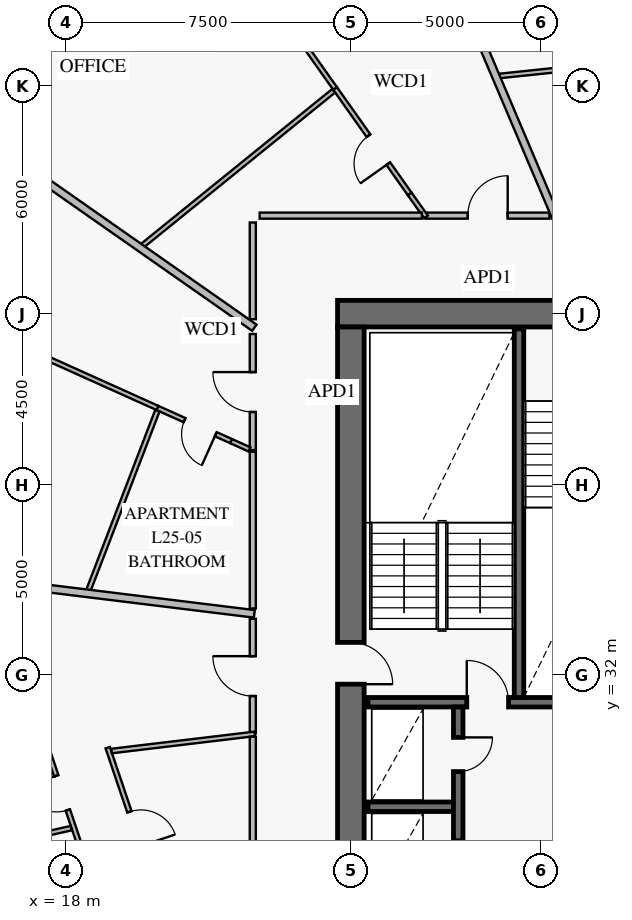
"""IFC4 building model, lengths in metres.
Left out: names, types, materials, properties, quantities, classifications, styles, units other than length and angle.
Written with IfcOpenShell. Run it as: python <this file> out.ifc"""

import sys

from ifc_helpers import new_model, si_unit, direction, frame, frame_2d, origin, place, context, subcontext, project, spatial, rectangle, extrude, element, fill, save


model = new_model("IFC4")
c1 = context("Model", 3, precision=1e-05, world=origin(), true_north=direction((0.0, 1.0)))
c2 = subcontext(c1, "Body", "Model", "MODEL_VIEW")
j1 = project(units=[si_unit("LENGTHUNIT", "METRE"), si_unit("PLANEANGLEUNIT", "RADIAN")], contexts=[c1])
p1 = place(None, origin())
s1 = spatial("IfcSite", under=j1, at=p1, CompositionType="ELEMENT")
p2 = place(p1, origin())
s2 = spatial("IfcBuilding", under=s1, at=p2, CompositionType="ELEMENT")
p3 = place(p2, frame((0.0, 0.0, 103.8)))
s3 = spatial("IfcBuildingStorey", under=s2, at=p3, CompositionType="ELEMENT", Elevation=103.8)
p4 = place(p3, frame((36.75, 41.5, 0.0), z_axis=(0.0, 0.0, 1.0), x_axis=(-1.0, 0.0, 0.0)))
e1 = element("IfcWall", 1, at=p4, inside=s3, PredefinedType="SHEAR", context=c2, shape_type="SweptSolid", body=[
    extrude(rectangle(XDim=11.6, YDim=0.7, at=frame_2d((5.8, 0.0))), origin(), (0.0, 0.0, 1.0), 3.8),
])
p5 = place(p4, frame((4.25, 0.0, 0.0)))
e2 = element("IfcOpeningElement", 2, at=p5, cuts=e1, PredefinedType="OPENING", context=c2, shape_type="SweptSolid", body=[
    extrude(rectangle(XDim=1.1, YDim=2.15, at=frame_2d((0.55, 1.075))), frame((0.0, 0.362, 0.0), z_axis=(0.0, -1.0, 0.0), x_axis=(1.0, 0.0, 0.0)), (0.0, 0.0, 1.0), 0.724),
])
p6 = place(p3, frame((25.5, 22.85, 0.0), z_axis=(0.0, 0.0, 1.0), x_axis=(0.0, 1.0, 0.0)))
e3 = element("IfcWall", 3, at=p6, inside=s3, PredefinedType="SHEAR", context=c2, shape_type="SweptSolid", body=[
    extrude(rectangle(XDim=18.3, YDim=0.7, at=frame_2d((9.15, 0.0))), origin(), (0.0, 0.0, 1.0), 3.8),
])
p7 = place(p6, frame((8.9, 0.0, 0.0)))
e4 = element("IfcOpeningElement", 4, at=p7, cuts=e3, PredefinedType="OPENING", context=c2, shape_type="SweptSolid", body=[
    extrude(rectangle(XDim=1.1, YDim=2.15, at=frame_2d((0.55, 1.075))), frame((0.0, 0.362, 0.0), z_axis=(0.0, -1.0, 0.0), x_axis=(1.0, 0.0, 0.0)), (0.0, 0.0, 1.0), 0.724),
])
p8 = place(p3, frame((25.95, 31.275, 0.0), z_axis=(0.0, 0.0, 1.0), x_axis=(1.0, 0.0, 0.0)))
e5 = element("IfcWall", 5, at=p8, inside=s3, PredefinedType="SOLIDWALL", context=c2, shape_type="SweptSolid", body=[
    extrude(rectangle(XDim=20.1, YDim=0.25, at=frame_2d((10.05, 0.0))), origin(), (0.0, 0.0, 1.0), 3.8),
])
p9 = place(p8, frame((2.6, 0.0, 0.0)))
e6 = element("IfcOpeningElement", 6, at=p9, cuts=e5, PredefinedType="OPENING", context=c2, shape_type="SweptSolid", body=[
    extrude(rectangle(XDim=1.1, YDim=2.15, at=frame_2d((0.55, 1.075))), frame((0.0, 0.137, 0.0), z_axis=(0.0, -1.0, 0.0), x_axis=(1.0, 0.0, 0.0)), (0.0, 0.0, 1.0), 0.274),
])
p10 = place(p8, frame((10.6, 0.0, 0.0)))
e7 = element("IfcOpeningElement", 7, at=p10, cuts=e5, PredefinedType="OPENING", context=c2, shape_type="SweptSolid", body=[
    extrude(rectangle(XDim=1.1, YDim=2.15, at=frame_2d((0.55, 1.075))), frame((0.0, 0.137, 0.0), z_axis=(0.0, -1.0, 0.0), x_axis=(1.0, 0.0, 0.0)), (0.0, 0.0, 1.0), 0.274),
])
p11 = place(p8, frame((16.35, 0.0, 0.0)))
e8 = element("IfcOpeningElement", 8, at=p11, cuts=e5, PredefinedType="OPENING", context=c2, shape_type="SweptSolid", body=[
    extrude(rectangle(XDim=1.1, YDim=2.15, at=frame_2d((0.55, 1.075))), frame((0.0, 0.137, 0.0), z_axis=(0.0, -1.0, 0.0), x_axis=(1.0, 0.0, 0.0)), (0.0, 0.0, 1.0), 0.274),
])
p12 = place(p3, frame((29.925, 31.4, 0.0), z_axis=(0.0, 0.0, 1.0), x_axis=(0.0, 1.0, 0.0)))
e9 = element("IfcWall", 9, at=p12, inside=s3, PredefinedType="SOLIDWALL", context=c2, shape_type="SweptSolid", body=[
    extrude(rectangle(XDim=9.7, YDim=0.25, at=frame_2d((4.85, 0.0))), origin(), (0.0, 0.0, 1.0), 3.8),
])
p13 = place(p3, frame((25.95, 28.525, 0.0), z_axis=(0.0, 0.0, 1.0), x_axis=(1.0, 0.0, 0.0)))
e10 = element("IfcWall", 10, at=p13, inside=s3, PredefinedType="SOLIDWALL", context=c2, shape_type="SweptSolid", body=[
    extrude(rectangle(XDim=2.25, YDim=0.25, at=frame_2d((1.125, 0.0))), origin(), (0.0, 0.0, 1.0), 3.8),
])
p14 = place(p3, frame((28.325, 22.95, 0.0), z_axis=(0.0, 0.0, 1.0), x_axis=(0.0, 1.0, 0.0)))
e11 = element("IfcWall", 11, at=p14, inside=s3, PredefinedType="SOLIDWALL", context=c2, shape_type="SweptSolid", body=[
    extrude(rectangle(XDim=8.2, YDim=0.25, at=frame_2d((4.1, 0.0))), origin(), (0.0, 0.0, 1.0), 3.8),
])
p15 = place(p14, frame((0.75, 0.0, 0.0)))
e12 = element("IfcOpeningElement", 12, at=p15, cuts=e11, PredefinedType="OPENING", context=c2, shape_type="SweptSolid", body=[
    extrude(rectangle(XDim=1.3, YDim=2.3, at=frame_2d((0.65, 1.15))), frame((0.0, 0.137, 0.0), z_axis=(0.0, -1.0, 0.0), x_axis=(1.0, 0.0, 0.0)), (0.0, 0.0, 1.0), 0.274),
])
p16 = place(p14, frame((3.78, 0.0, 0.0)))
e13 = element("IfcOpeningElement", 13, at=p16, cuts=e11, PredefinedType="OPENING", context=c2, shape_type="SweptSolid", body=[
    extrude(rectangle(XDim=0.9, YDim=2.1, at=frame_2d((0.45, 1.05))), frame((0.0, 0.137, 0.0), z_axis=(0.0, -1.0, 0.0), x_axis=(1.0, 0.0, 0.0)), (0.0, 0.0, 1.0), 0.274),
])
p17 = place(p14, frame((6.5, 0.0, 0.0)))
e14 = element("IfcOpeningElement", 14, at=p17, cuts=e11, PredefinedType="OPENING", context=c2, shape_type="SweptSolid", body=[
    extrude(rectangle(XDim=0.9, YDim=2.1, at=frame_2d((0.45, 1.05))), frame((0.0, 0.137, 0.0), z_axis=(0.0, -1.0, 0.0), x_axis=(1.0, 0.0, 0.0)), (0.0, 0.0, 1.0), 0.274),
])
p18 = place(p3, frame((27.05, 44.65, 0.0), z_axis=(0.0, 0.0, 1.0), x_axis=(-0.577553372085, 0.816352927595, 0.0)))
e15 = element("IfcWall", 15, at=p18, inside=s3, PredefinedType="PARTITIONING", context=c2, shape_type="SweptSolid", body=[
    extrude(rectangle(XDim=3.402, YDim=0.12, at=frame_2d((1.701, 0.0))), origin(), (0.0, 0.0, 1.0), 3.55),
])
p19 = place(p18, frame((0.979, 0.0, 0.0)))
e16 = element("IfcOpeningElement", 16, at=p19, cuts=e15, PredefinedType="OPENING", context=c2, shape_type="SweptSolid", body=[
    extrude(rectangle(XDim=0.9, YDim=2.1, at=frame_2d((0.45, 1.05))), frame((0.0, 0.072, 0.0), z_axis=(0.0, -1.0, 0.0), x_axis=(1.0, 0.0, 0.0)), (0.0, 0.0, 1.0), 0.144),
])
p20 = place(p3, frame((25.085, 47.427, 0.0), z_axis=(0.0, 0.0, 1.0), x_axis=(-0.577572190058, 0.81633961393, 0.0)))
e17 = element("IfcWall", 17, at=p20, inside=s3, PredefinedType="PARTITIONING", context=c2, shape_type="SweptSolid", body=[
    extrude(rectangle(XDim=7.275, YDim=0.12, at=frame_2d((3.638, 0.0))), origin(), (0.0, 0.0, 1.0), 3.1),
])
p21 = place(p20, frame((4.044, 0.0, 0.0)))
e18 = element("IfcOpeningElement", 18, at=p21, cuts=e17, PredefinedType="OPENING", context=c2, shape_type="SweptSolid", body=[
    extrude(rectangle(XDim=0.95, YDim=2.1, at=frame_2d((0.475, 1.05))), frame((0.0, 0.072, 0.0), z_axis=(0.0, -1.0, 0.0), x_axis=(1.0, 0.0, 0.0)), (0.0, 0.0, 1.0), 0.144),
])
p22 = place(p3, frame((30.726, 44.08, 0.0), z_axis=(0.0, 0.0, 1.0), x_axis=(-1.0, 0.0, 0.0)))
e19 = element("IfcWall", 19, at=p22, inside=s3, PredefinedType="PARTITIONING", context=c2, shape_type="SweptSolid", body=[
    extrude(rectangle(XDim=3.248, YDim=0.16, at=frame_2d((1.624, 0.0))), origin(), (0.0, 0.0, 1.0), 3.55),
])
p23 = place(p22, frame((1.099, 0.0, 0.0)))
e20 = element("IfcOpeningElement", 20, at=p23, cuts=e19, PredefinedType="OPENING", context=c2, shape_type="SweptSolid", body=[
    extrude(rectangle(XDim=1.05, YDim=2.15, at=frame_2d((0.525, 1.075))), frame((0.0, 0.092, 0.0), z_axis=(0.0, -1.0, 0.0), x_axis=(1.0, 0.0, 0.0)), (0.0, 0.0, 1.0), 0.184),
])
p24 = place(p3, frame((22.35, 38.146, 0.0), z_axis=(0.0, 0.0, 1.0), x_axis=(-0.911826982845, 0.410574662341, 0.0)))
e21 = element("IfcWall", 21, at=p24, inside=s3, PredefinedType="PARTITIONING", context=c2, shape_type="SweptSolid", body=[
    extrude(rectangle(XDim=2.127, YDim=0.12, at=frame_2d((1.063, 0.0))), origin(), (0.0, 0.0, 1.0), 3.55),
])
p25 = place(p24, frame((0.443, 0.0, 0.0)))
e22 = element("IfcOpeningElement", 22, at=p25, cuts=e21, PredefinedType="OPENING", context=c2, shape_type="SweptSolid", body=[
    extrude(rectangle(XDim=0.9, YDim=2.1, at=frame_2d((0.45, 1.05))), frame((0.0, 0.072, 0.0), z_axis=(0.0, -1.0, 0.0), x_axis=(1.0, 0.0, 0.0)), (0.0, 0.0, 1.0), 0.144),
])
p26 = place(p3, frame((20.411, 39.019, 0.0), z_axis=(0.0, 0.0, 1.0), x_axis=(-0.911837449282, 0.410551417104, 0.0)))
e23 = element("IfcWall", 23, at=p26, inside=s3, PredefinedType="PARTITIONING", context=c2, shape_type="SweptSolid", body=[
    extrude(rectangle(XDim=9.404, YDim=0.12, at=frame_2d((4.702, 0.0))), origin(), (0.0, 0.0, 1.0), 3.1),
])
p27 = place(p26, frame((4.202, 0.0, 0.0)))
e24 = element("IfcOpeningElement", 24, at=p27, cuts=e23, PredefinedType="OPENING", context=c2, shape_type="SweptSolid", body=[
    extrude(rectangle(XDim=0.95, YDim=2.1, at=frame_2d((0.475, 1.05))), frame((0.0, 0.072, 0.0), z_axis=(0.0, -1.0, 0.0), x_axis=(1.0, 0.0, 0.0)), (0.0, 0.0, 1.0), 0.144),
])
p28 = place(p3, frame((22.92, 40.965, 0.0), z_axis=(0.0, 0.0, 1.0), x_axis=(0.0, -1.0, 0.0)))
e25 = element("IfcWall", 25, at=p28, inside=s3, PredefinedType="PARTITIONING", context=c2, shape_type="SweptSolid", body=[
    extrude(rectangle(XDim=3.054, YDim=0.16, at=frame_2d((1.527, 0.0))), origin(), (0.0, 0.0, 1.0), 3.55),
])
p29 = place(p28, frame((1.002, 0.0, 0.0)))
e26 = element("IfcOpeningElement", 26, at=p29, cuts=e25, PredefinedType="OPENING", context=c2, shape_type="SweptSolid", body=[
    extrude(rectangle(XDim=1.05, YDim=2.15, at=frame_2d((0.525, 1.075))), frame((0.0, 0.092, 0.0), z_axis=(0.0, -1.0, 0.0), x_axis=(1.0, 0.0, 0.0)), (0.0, 0.0, 1.0), 0.184),
])
p30 = place(p3, frame((19.103, 30.08, 0.0), z_axis=(0.0, 0.0, 1.0), x_axis=(0.319961945867, -0.947430394909, 0.0)))
e27 = element("IfcWall", 27, at=p30, inside=s3, PredefinedType="PARTITIONING", context=c2, shape_type="SweptSolid", body=[
    extrude(rectangle(XDim=7.174, YDim=0.12, at=frame_2d((3.587, 0.0))), origin(), (0.0, 0.0, 1.0), 2.85),
])
p31 = place(p30, frame((1.782, 0.0, 0.0)))
e28 = element("IfcOpeningElement", 28, at=p31, cuts=e27, PredefinedType="OPENING", context=c2, shape_type="SweptSolid", body=[
    extrude(rectangle(XDim=0.95, YDim=2.1, at=frame_2d((0.475, 1.05))), frame((0.0, 0.072, 0.0), z_axis=(0.0, -1.0, 0.0), x_axis=(1.0, 0.0, 0.0)), (0.0, 0.0, 1.0), 0.144),
])
p32 = place(p30, frame((5.292, 0.0, 0.0)))
e29 = element("IfcOpeningElement", 29, at=p32, cuts=e27, PredefinedType="OPENING", context=c2, shape_type="SweptSolid", body=[
    extrude(rectangle(XDim=0.9, YDim=2.1, at=frame_2d((0.45, 1.05))), frame((0.0, 0.072, 0.0), z_axis=(0.0, -1.0, 0.0), x_axis=(1.0, 0.0, 0.0)), (0.0, 0.0, 1.0), 0.144),
])
p33 = place(p3, frame((17.561, 29.896, 0.0), z_axis=(0.0, 0.0, 1.0), x_axis=(0.319947688878, -0.947435209596, 0.0)))
e30 = element("IfcWall", 30, at=p33, inside=s3, PredefinedType="PARTITIONING", context=c2, shape_type="SweptSolid", body=[
    extrude(rectangle(XDim=7.812, YDim=0.12, at=frame_2d((3.906, 0.0))), origin(), (0.0, 0.0, 1.0), 2.85),
])
p34 = place(p33, frame((0.587, 0.0, 0.0)))
e31 = element("IfcOpeningElement", 31, at=p34, cuts=e30, PredefinedType="OPENING", context=c2, shape_type="SweptSolid", body=[
    extrude(rectangle(XDim=0.95, YDim=2.1, at=frame_2d((0.475, 1.05))), frame((0.0, 0.072, 0.0), z_axis=(0.0, -1.0, 0.0), x_axis=(1.0, 0.0, 0.0)), (0.0, 0.0, 1.0), 0.144),
])
p35 = place(p33, frame((2.49, 0.0, 0.0)))
e32 = element("IfcOpeningElement", 32, at=p35, cuts=e30, PredefinedType="OPENING", context=c2, shape_type="SweptSolid", body=[
    extrude(rectangle(XDim=0.95, YDim=2.1, at=frame_2d((0.475, 1.05))), frame((0.0, 0.072, 0.0), z_axis=(0.0, -1.0, 0.0), x_axis=(1.0, 0.0, 0.0)), (0.0, 0.0, 1.0), 0.144),
])
p36 = place(p33, frame((4.372, 0.0, 0.0)))
e33 = element("IfcOpeningElement", 33, at=p36, cuts=e30, PredefinedType="OPENING", context=c2, shape_type="SweptSolid", body=[
    extrude(rectangle(XDim=0.95, YDim=2.1, at=frame_2d((0.475, 1.05))), frame((0.0, 0.072, 0.0), z_axis=(0.0, -1.0, 0.0), x_axis=(1.0, 0.0, 0.0)), (0.0, 0.0, 1.0), 0.144),
])
p37 = place(p33, frame((6.274, 0.0, 0.0)))
e34 = element("IfcOpeningElement", 34, at=p37, cuts=e30, PredefinedType="OPENING", context=c2, shape_type="SweptSolid", body=[
    extrude(rectangle(XDim=0.95, YDim=2.1, at=frame_2d((0.475, 1.05))), frame((0.0, 0.072, 0.0), z_axis=(0.0, -1.0, 0.0), x_axis=(1.0, 0.0, 0.0)), (0.0, 0.0, 1.0), 0.144),
])
p38 = place(p3, frame((22.92, 33.47, 0.0), z_axis=(0.0, 0.0, 1.0), x_axis=(0.0, -1.0, 0.0)))
e35 = element("IfcWall", 35, at=p38, inside=s3, PredefinedType="PARTITIONING", context=c2, shape_type="SweptSolid", body=[
    extrude(rectangle(XDim=3.014, YDim=0.16, at=frame_2d((1.507, 0.0))), origin(), (0.0, 0.0, 1.0), 3.55),
])
p39 = place(p38, frame((0.982, 0.0, 0.0)))
e36 = element("IfcOpeningElement", 36, at=p39, cuts=e35, PredefinedType="OPENING", context=c2, shape_type="SweptSolid", body=[
    extrude(rectangle(XDim=1.05, YDim=2.15, at=frame_2d((0.525, 1.075))), frame((0.0, 0.092, 0.0), z_axis=(0.0, -1.0, 0.0), x_axis=(1.0, 0.0, 0.0)), (0.0, 0.0, 1.0), 0.184),
])
p40 = place(p3, frame((35.348, 48.379, 0.0), z_axis=(0.0, 0.0, 1.0), x_axis=(-0.994520791482, -0.104538965509, 0.0)))
e37 = element("IfcWall", 37, at=p40, inside=s3, PredefinedType="PARTITIONING", context=c2, shape_type="SweptSolid", body=[
    extrude(rectangle(XDim=6.014, YDim=0.12, at=frame_2d((3.007, 0.0))), origin(), (0.0, 0.0, 1.0), 2.85),
])
p41 = place(p3, frame((30.889, 44.04, 0.0), z_axis=(0.0, 0.0, 1.0), x_axis=(-0.39073950449, 0.920501298006, 0.0)))
e38 = element("IfcWall", 38, at=p41, inside=s3, PredefinedType="PARTITIONING", context=c2, shape_type="SweptSolid", body=[
    extrude(rectangle(XDim=18.38, YDim=0.2, at=frame_2d((9.19, 0.0))), origin(), (0.0, 0.0, 1.0), 2.8),
])
p42 = place(p3, frame((27.478, 44.045, 0.0), z_axis=(0.0, 0.0, 1.0), x_axis=(-0.577834412399, 0.816154024586, 0.0)))
e39 = element("IfcWall", 39, at=p42, inside=s3, PredefinedType="PARTITIONING", context=c2, shape_type="SweptSolid", body=[
    extrude(rectangle(XDim=0.741, YDim=0.12, at=frame_2d((0.37, 0.0))), origin(), (0.0, 0.0, 1.0), 3.55),
])
p43 = place(p3, frame((25.046, 47.364, 0.0), z_axis=(0.0, 0.0, 1.0), x_axis=(-0.777136993878, -0.629331464926, 0.0)))
e40 = element("IfcWall", 40, at=p43, inside=s3, PredefinedType="PARTITIONING", context=c2, shape_type="SweptSolid", body=[
    extrude(rectangle(XDim=6.483, YDim=0.12, at=frame_2d((3.242, 0.0))), origin(), (0.0, 0.0, 1.0), 2.85),
])
p44 = place(p3, frame((22.96, 41.131, 0.0), z_axis=(0.0, 0.0, 1.0), x_axis=(-0.819148180014, 0.573581955068, 0.0)))
e41 = element("IfcWall", 41, at=p44, inside=s3, PredefinedType="PARTITIONING", context=c2, shape_type="SweptSolid", body=[
    extrude(rectangle(XDim=13.15, YDim=0.2, at=frame_2d((6.575, 0.0))), origin(), (0.0, 0.0, 1.0), 2.8),
])
p45 = place(p3, frame((22.832, 37.929, 0.0), z_axis=(0.0, 0.0, 1.0), x_axis=(-0.911800467551, 0.410633543897, 0.0)))
e42 = element("IfcWall", 42, at=p45, inside=s3, PredefinedType="PARTITIONING", context=c2, shape_type="SweptSolid", body=[
    extrude(rectangle(XDim=0.529, YDim=0.12, at=frame_2d((0.264, 0.0))), origin(), (0.0, 0.0, 1.0), 3.55),
])
p46 = place(p3, frame((20.409, 38.945, 0.0), z_axis=(0.0, 0.0, 1.0), x_axis=(-0.358374938657, -0.933577743598, 0.0)))
e43 = element("IfcWall", 43, at=p46, inside=s3, PredefinedType="PARTITIONING", context=c2, shape_type="SweptSolid", body=[
    extrude(rectangle(XDim=5.092, YDim=0.12, at=frame_2d((2.546, 0.0))), origin(), (0.0, 0.0, 1.0), 2.85),
])
p47 = place(p3, frame((22.96, 33.601, 0.0), z_axis=(0.0, 0.0, 1.0), x_axis=(-0.99254551981, 0.121874489148, 0.0)))
e44 = element("IfcWall", 44, at=p47, inside=s3, PredefinedType="PARTITIONING", context=c2, shape_type="SweptSolid", body=[
    extrude(rectangle(XDim=18.321, YDim=0.2, at=frame_2d((9.161, 0.0))), origin(), (0.0, 0.0, 1.0), 2.8),
])
p48 = place(p3, frame((18.142, 27.962, 0.0), z_axis=(0.0, 0.0, 1.0), x_axis=(-0.975378348773, -0.220538152583, 0.0)))
e45 = element("IfcWall", 45, at=p48, inside=s3, PredefinedType="PARTITIONING", context=c2, shape_type="SweptSolid", body=[
    extrude(rectangle(XDim=12.026, YDim=0.12, at=frame_2d((6.013, 0.0))), origin(), (0.0, 0.0, 1.0), 2.8),
])
p49 = place(p3, frame((22.97, 30.442, 0.0), z_axis=(0.0, 0.0, 1.0), x_axis=(-0.992919730028, -0.118787245617, 0.0)))
e46 = element("IfcWall", 46, at=p49, inside=s3, PredefinedType="PARTITIONING", context=c2, shape_type="SweptSolid", body=[
    extrude(rectangle(XDim=3.792, YDim=0.12, at=frame_2d((1.896, 0.0))), origin(), (0.0, 0.0, 1.0), 3.55),
])
p50 = place(p3, frame((27.37, 44.08, 0.0), z_axis=(0.0, 0.0, 1.0), x_axis=(-1.0, 0.0, 0.0)))
e47 = element("IfcWall", 47, at=p50, inside=s3, PredefinedType="PARTITIONING", context=c2, shape_type="SweptSolid", body=[
    extrude(rectangle(XDim=4.27, YDim=0.16, at=frame_2d((2.135, 0.0))), origin(), (0.0, 0.0, 1.0), 2.85),
])
p51 = place(p3, frame((22.92, 43.9, 0.0), z_axis=(0.0, 0.0, 1.0), x_axis=(0.0, -1.0, 0.0)))
e48 = element("IfcWall", 48, at=p51, inside=s3, PredefinedType="PARTITIONING", context=c2, shape_type="SweptSolid", body=[
    extrude(rectangle(XDim=2.545, YDim=0.16, at=frame_2d((1.273, 0.0))), origin(), (0.0, 0.0, 1.0), 3.55),
])
p52 = place(p3, frame((22.92, 37.867, 0.0), z_axis=(0.0, 0.0, 1.0), x_axis=(0.0, -1.0, 0.0)))
e49 = element("IfcWall", 49, at=p52, inside=s3, PredefinedType="PARTITIONING", context=c2, shape_type="SweptSolid", body=[
    extrude(rectangle(XDim=4.125, YDim=0.16, at=frame_2d((2.062, 0.0))), origin(), (0.0, 0.0, 1.0), 2.85),
])
p53 = place(p3, frame((22.92, 30.367, 0.0), z_axis=(0.0, 0.0, 1.0), x_axis=(0.0, -1.0, 0.0)))
e50 = element("IfcWall", 50, at=p53, inside=s3, PredefinedType="PARTITIONING", context=c2, shape_type="SweptSolid", body=[
    extrude(rectangle(XDim=3.447, YDim=0.16, at=frame_2d((1.723, 0.0))), origin(), (0.0, 0.0, 1.0), 2.85),
])
p54 = place(p7, frame((1.1, 0.0, 0.0), z_axis=(0.0, 0.0, 1.0), x_axis=(-1.0, 0.0, 0.0)))
e51 = element("IfcDoor", 51, at=p54, inside=s3, OperationType="SINGLE_SWING_RIGHT", PredefinedType="USERDEFINED", context=c2, shape_type="SweptSolid", body=[
    extrude(rectangle(XDim=1.1, YDim=2.15, at=frame_2d((0.55, 1.075))), frame((0.0, 0.025, 0.0), z_axis=(0.0, -1.0, 0.0), x_axis=(1.0, 0.0, 0.0)), (0.0, 0.0, 1.0), 0.05),
])
fill(e4, e51)
p55 = place(p9, origin())
e52 = element("IfcDoor", 52, at=p55, inside=s3, OperationType="SINGLE_SWING_LEFT", PredefinedType="USERDEFINED", context=c2, shape_type="SweptSolid", body=[
    extrude(rectangle(XDim=1.1, YDim=2.15, at=frame_2d((0.55, 1.075))), frame((0.0, 0.025, 0.0), z_axis=(0.0, -1.0, 0.0), x_axis=(1.0, 0.0, 0.0)), (0.0, 0.0, 1.0), 0.05),
])
fill(e6, e52)
p56 = place(p17, frame((0.9, 0.0, 0.0), z_axis=(0.0, 0.0, 1.0), x_axis=(-1.0, 0.0, 0.0)))
e53 = element("IfcDoor", 53, at=p56, inside=s3, OperationType="SINGLE_SWING_LEFT", PredefinedType="DOOR", context=c2, shape_type="SweptSolid", body=[
    extrude(rectangle(XDim=0.9, YDim=2.1, at=frame_2d((0.45, 1.05))), frame((0.0, 0.025, 0.0), z_axis=(0.0, -1.0, 0.0), x_axis=(1.0, 0.0, 0.0)), (0.0, 0.0, 1.0), 0.05),
])
fill(e14, e53)
p57 = place(p19, origin())
e54 = element("IfcDoor", 54, at=p57, inside=s3, OperationType="SINGLE_SWING_LEFT", PredefinedType="DOOR", context=c2, shape_type="SweptSolid", body=[
    extrude(rectangle(XDim=0.9, YDim=2.1, at=frame_2d((0.45, 1.05))), frame((0.0, 0.025, 0.0), z_axis=(0.0, -1.0, 0.0), x_axis=(1.0, 0.0, 0.0)), (0.0, 0.0, 1.0), 0.05),
])
fill(e16, e54)
p58 = place(p23, frame((1.05, 0.0, 0.0), z_axis=(0.0, 0.0, 1.0), x_axis=(-1.0, 0.0, 0.0)))
e55 = element("IfcDoor", 55, at=p58, inside=s3, OperationType="SINGLE_SWING_RIGHT", PredefinedType="DOOR", context=c2, shape_type="SweptSolid", body=[
    extrude(rectangle(XDim=1.05, YDim=2.15, at=frame_2d((0.525, 1.075))), frame((0.0, 0.025, 0.0), z_axis=(0.0, -1.0, 0.0), x_axis=(1.0, 0.0, 0.0)), (0.0, 0.0, 1.0), 0.05),
])
fill(e20, e55)
p59 = place(p25, origin())
e56 = element("IfcDoor", 56, at=p59, inside=s3, OperationType="SINGLE_SWING_LEFT", PredefinedType="DOOR", context=c2, shape_type="SweptSolid", body=[
    extrude(rectangle(XDim=0.9, YDim=2.1, at=frame_2d((0.45, 1.05))), frame((0.0, 0.025, 0.0), z_axis=(0.0, -1.0, 0.0), x_axis=(1.0, 0.0, 0.0)), (0.0, 0.0, 1.0), 0.05),
])
fill(e22, e56)
p60 = place(p29, frame((1.05, 0.0, 0.0), z_axis=(0.0, 0.0, 1.0), x_axis=(-1.0, 0.0, 0.0)))
e57 = element("IfcDoor", 57, at=p60, inside=s3, OperationType="SINGLE_SWING_RIGHT", PredefinedType="DOOR", context=c2, shape_type="SweptSolid", body=[
    extrude(rectangle(XDim=1.05, YDim=2.15, at=frame_2d((0.525, 1.075))), frame((0.0, 0.025, 0.0), z_axis=(0.0, -1.0, 0.0), x_axis=(1.0, 0.0, 0.0)), (0.0, 0.0, 1.0), 0.05),
])
fill(e26, e57)
p61 = place(p31, origin())
e58 = element("IfcDoor", 58, at=p61, inside=s3, OperationType="SINGLE_SWING_RIGHT", PredefinedType="DOOR", context=c2, shape_type="SweptSolid", body=[
    extrude(rectangle(XDim=0.95, YDim=2.1, at=frame_2d((0.475, 1.05))), frame((0.0, 0.025, 0.0), z_axis=(0.0, -1.0, 0.0), x_axis=(1.0, 0.0, 0.0)), (0.0, 0.0, 1.0), 0.05),
])
fill(e28, e58)
p62 = place(p34, frame((0.95, 0.0, 0.0), z_axis=(0.0, 0.0, 1.0), x_axis=(-1.0, 0.0, 0.0)))
e59 = element("IfcDoor", 59, at=p62, inside=s3, OperationType="SINGLE_SWING_RIGHT", PredefinedType="DOOR", context=c2, shape_type="SweptSolid", body=[
    extrude(rectangle(XDim=0.95, YDim=2.1, at=frame_2d((0.475, 1.05))), frame((0.0, 0.025, 0.0), z_axis=(0.0, -1.0, 0.0), x_axis=(1.0, 0.0, 0.0)), (0.0, 0.0, 1.0), 0.05),
])
fill(e31, e59)
p63 = place(p39, frame((1.05, 0.0, 0.0), z_axis=(0.0, 0.0, 1.0), x_axis=(-1.0, 0.0, 0.0)))
e60 = element("IfcDoor", 60, at=p63, inside=s3, OperationType="SINGLE_SWING_RIGHT", PredefinedType="DOOR", context=c2, shape_type="SweptSolid", body=[
    extrude(rectangle(XDim=1.05, YDim=2.15, at=frame_2d((0.525, 1.075))), frame((0.0, 0.025, 0.0), z_axis=(0.0, -1.0, 0.0), x_axis=(1.0, 0.0, 0.0)), (0.0, 0.0, 1.0), 0.05),
])
fill(e36, e60)
save(model, sys.argv[1])
